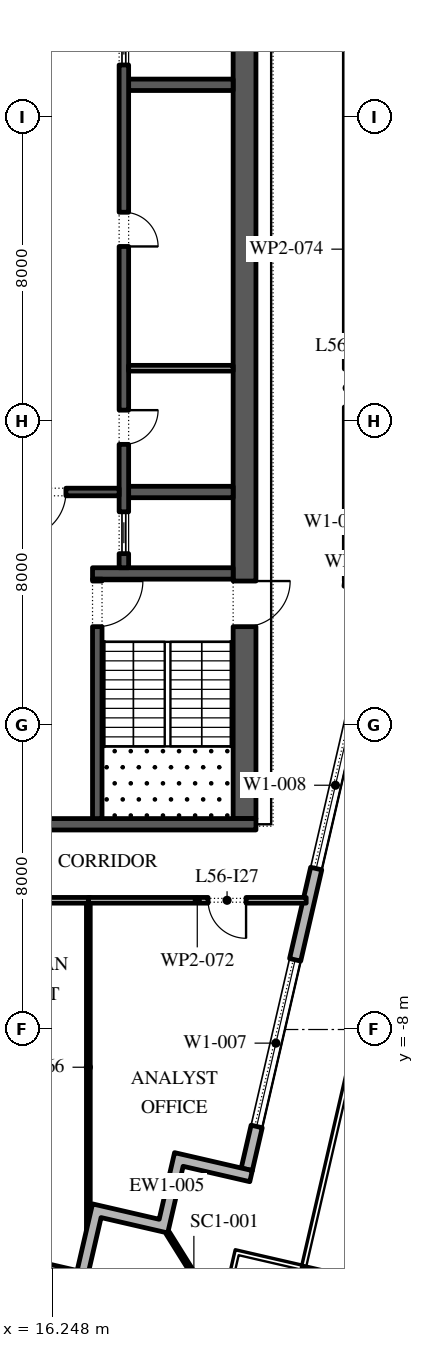
"""IFC4 building model, lengths in metres.
Left out: names, types, materials, properties, quantities, classifications, styles, units other than length and angle.
Written with IfcOpenShell. Run it as: python <this file> out.ifc"""

import sys

from ifc_helpers import new_model, si_unit, direction, frame, frame_2d, origin, origin_2d, place, context, subcontext, project, spatial, polyline, rectangle, outline, extrude, element, fill, save


model = new_model("IFC4")
c1 = context("Model", 3, precision=1e-05, world=origin(), true_north=direction((0.0, 1.0)))
c2 = subcontext(c1, "Body", "Model", "MODEL_VIEW")
j1 = project(units=[si_unit("LENGTHUNIT", "METRE"), si_unit("PLANEANGLEUNIT", "RADIAN")], contexts=[c1])
p1 = place(None, origin())
s1 = spatial("IfcSite", under=j1, at=p1, CompositionType="ELEMENT")
p2 = place(p1, origin())
s2 = spatial("IfcBuilding", under=s1, at=p2, CompositionType="ELEMENT")
p3 = place(p2, frame((0.0, 0.0, 259.8)))
s3 = spatial("IfcBuildingStorey", under=s2, at=p3, CompositionType="ELEMENT", Elevation=259.8)
p4 = place(p3, frame((23.236, -14.883, 0.0), z_axis=(0.0, 0.0, 1.0), x_axis=(0.974370064785, -0.224951054344, 0.0)))
e1 = element("IfcColumn", 1, at=p4, inside=s3, PredefinedType="COLUMN", context=c2, shape_type="SweptSolid", body=[
    extrude(rectangle(XDim=1.1, YDim=1.1, at=origin_2d()), origin(), (0.0, 0.0, 1.0), 4.2),
])
p5 = place(p3, frame((-29.616, -3.758, 0.0), z_axis=(0.0, 0.0, 1.0), x_axis=(0.974370532314, -0.224949029246, 0.0)))
e2 = element("IfcWall", 2, at=p5, inside=s3, PredefinedType="STANDARD", context=c2, shape_type="SweptSolid", body=[
    extrude(rectangle(XDim=48.0, YDim=0.3, at=frame_2d((24.0, 0.0))), origin(), (0.0, 0.0, 1.0), 4.0),
])
p6 = place(p5, frame((1.625, 0.0, 0.45)))
e3 = element("IfcOpeningElement", 3, at=p6, cuts=e2, PredefinedType="OPENING", context=c2, shape_type="SweptSolid", body=[
    extrude(rectangle(XDim=4.5, YDim=3.05, at=frame_2d((2.25, 1.525))), frame((0.0, 0.16, 0.0), z_axis=(0.0, -1.0, 0.0), x_axis=(1.0, 0.0, 0.0)), (0.0, 0.0, 1.0), 0.32),
])
p7 = place(p5, frame((10.575, 0.0, 0.0)))
e4 = element("IfcOpeningElement", 4, at=p7, cuts=e2, PredefinedType="OPENING", context=c2, shape_type="SweptSolid", body=[
    extrude(rectangle(XDim=2.4, YDim=3.5, at=frame_2d((1.2, 1.75))), frame((0.0, 0.16, 0.0), z_axis=(0.0, -1.0, 0.0), x_axis=(1.0, 0.0, 0.0)), (0.0, 0.0, 1.0), 0.32),
])
p8 = place(p5, frame((17.575, 0.0, 0.45)))
e5 = element("IfcOpeningElement", 5, at=p8, cuts=e2, PredefinedType="OPENING", context=c2, shape_type="SweptSolid", body=[
    extrude(rectangle(XDim=4.5, YDim=3.0, at=frame_2d((2.25, 1.5))), frame((0.0, 0.16, 0.0), z_axis=(0.0, -1.0, 0.0), x_axis=(1.0, 0.0, 0.0)), (0.0, 0.0, 1.0), 0.32),
])
p9 = place(p5, frame((25.625, 0.0, 0.45)))
e6 = element("IfcOpeningElement", 6, at=p9, cuts=e2, PredefinedType="OPENING", context=c2, shape_type="SweptSolid", body=[
    extrude(rectangle(XDim=4.5, YDim=2.95, at=frame_2d((2.25, 1.475))), frame((0.0, 0.16, 0.0), z_axis=(0.0, -1.0, 0.0), x_axis=(1.0, 0.0, 0.0)), (0.0, 0.0, 1.0), 0.32),
])
p10 = place(p5, frame((33.675, 0.0, 0.45)))
e7 = element("IfcOpeningElement", 7, at=p10, cuts=e2, PredefinedType="OPENING", context=c2, shape_type="SweptSolid", body=[
    extrude(rectangle(XDim=4.5, YDim=2.825, at=frame_2d((2.25, 1.413))), frame((0.0, 0.16, 0.0), z_axis=(0.0, -1.0, 0.0), x_axis=(1.0, 0.0, 0.0)), (0.0, 0.0, 1.0), 0.32),
])
p11 = place(p5, frame((42.775, 0.0, 0.0)))
e8 = element("IfcOpeningElement", 8, at=p11, cuts=e2, PredefinedType="OPENING", context=c2, shape_type="SweptSolid", body=[
    extrude(rectangle(XDim=2.4, YDim=3.5, at=frame_2d((1.2, 1.75))), frame((0.0, 0.16, 0.0), z_axis=(0.0, -1.0, 0.0), x_axis=(1.0, 0.0, 0.0)), (0.0, 0.0, 1.0), 0.32),
])
p12 = place(p3, frame((21.359, -11.678, 0.0), z_axis=(0.0, 0.0, 1.0), x_axis=(0.224949198343, 0.974370493275, 0.0)))
e9 = element("IfcWall", 9, at=p12, inside=s3, PredefinedType="STANDARD", context=c2, shape_type="SweptSolid", body=[
    extrude(rectangle(XDim=49.5, YDim=0.3, at=frame_2d((24.75, 0.0))), origin(), (0.0, 0.0, 1.0), 4.0),
])
p13 = place(p12, frame((1.157, 0.0, 0.45)))
e10 = element("IfcOpeningElement", 10, at=p13, cuts=e9, PredefinedType="OPENING", context=c2, shape_type="SweptSolid", body=[
    extrude(rectangle(XDim=4.5, YDim=3.05, at=frame_2d((2.25, 1.525))), frame((0.0, 0.16, 0.0), z_axis=(0.0, -1.0, 0.0), x_axis=(1.0, 0.0, 0.0)), (0.0, 0.0, 1.0), 0.32),
])
p14 = place(p12, frame((8.121, 0.0, 0.45)))
e11 = element("IfcOpeningElement", 11, at=p14, cuts=e9, PredefinedType="OPENING", context=c2, shape_type="SweptSolid", body=[
    extrude(rectangle(XDim=4.5, YDim=3.05, at=frame_2d((2.25, 1.525))), frame((0.0, 0.16, 0.0), z_axis=(0.0, -1.0, 0.0), x_axis=(1.0, 0.0, 0.0)), (0.0, 0.0, 1.0), 0.32),
])
p15 = place(p12, frame((15.236, 0.0, 0.45)))
e12 = element("IfcOpeningElement", 12, at=p15, cuts=e9, PredefinedType="OPENING", context=c2, shape_type="SweptSolid", body=[
    extrude(rectangle(XDim=4.5, YDim=3.05, at=frame_2d((2.25, 1.525))), frame((0.0, 0.16, 0.0), z_axis=(0.0, -1.0, 0.0), x_axis=(1.0, 0.0, 0.0)), (0.0, 0.0, 1.0), 0.32),
])
p16 = place(p12, frame((22.35, 0.0, 0.45)))
e13 = element("IfcOpeningElement", 13, at=p16, cuts=e9, PredefinedType="OPENING", context=c2, shape_type="SweptSolid", body=[
    extrude(rectangle(XDim=4.5, YDim=3.05, at=frame_2d((2.25, 1.525))), frame((0.0, 0.16, 0.0), z_axis=(0.0, -1.0, 0.0), x_axis=(1.0, 0.0, 0.0)), (0.0, 0.0, 1.0), 0.32),
])
p17 = place(p12, frame((29.464, 0.0, 0.45)))
e14 = element("IfcOpeningElement", 14, at=p17, cuts=e9, PredefinedType="OPENING", context=c2, shape_type="SweptSolid", body=[
    extrude(rectangle(XDim=4.5, YDim=2.95, at=frame_2d((2.25, 1.475))), frame((0.0, 0.16, 0.0), z_axis=(0.0, -1.0, 0.0), x_axis=(1.0, 0.0, 0.0)), (0.0, 0.0, 1.0), 0.32),
])
p18 = place(p12, frame((37.628, 0.0, 0.0)))
e15 = element("IfcOpeningElement", 15, at=p18, cuts=e9, PredefinedType="OPENING", context=c2, shape_type="SweptSolid", body=[
    extrude(rectangle(XDim=2.4, YDim=3.325, at=frame_2d((1.2, 1.663))), frame((0.0, 0.16, 0.0), z_axis=(0.0, -1.0, 0.0), x_axis=(1.0, 0.0, 0.0)), (0.0, 0.0, 1.0), 0.32),
])
p19 = place(p12, frame((43.693, 0.0, 0.45)))
e16 = element("IfcOpeningElement", 16, at=p19, cuts=e9, PredefinedType="OPENING", context=c2, shape_type="SweptSolid", body=[
    extrude(rectangle(XDim=4.5, YDim=3.05, at=frame_2d((2.25, 1.525))), frame((0.0, 0.16, 0.0), z_axis=(0.0, -1.0, 0.0), x_axis=(1.0, 0.0, 0.0)), (0.0, 0.0, 1.0), 0.32),
])
p20 = place(p3, origin())
e17 = element("IfcWall", 17, at=p20, inside=s3, PredefinedType="STANDARD", context=c2, shape_type="SweptSolid", body=[
    extrude(outline(polyline([(19.054, -12.993), (19.459, -11.24), (21.505, -11.712), (21.438, -12.004), (19.684, -11.599), (19.279, -13.353), (17.525, -12.948), (17.188, -14.41), (16.895, -14.342), (17.3, -12.588), (19.054, -12.993)])), origin(), (0.0, 0.0, 1.0), 4.0),
])
p21 = place(p3, frame((19.279, -13.353, -0.05), z_axis=(0.0, 0.0, 1.0), x_axis=(0.529914407191, -0.848051131154, 0.0)))
e18 = element("IfcWall", 18, at=p21, inside=s3, PredefinedType="STANDARD", context=c2, shape_type="SweptSolid", body=[
    extrude(rectangle(XDim=2.596, YDim=0.1, at=frame_2d((1.298, 0.0))), origin(), (0.0, 0.0, 1.0), 4.05),
])
p22 = place(p3, frame((21.3, -2.45, 0.0), z_axis=(0.0, 0.0, 1.0), x_axis=(0.0, 1.0, 0.0)))
e19 = element("IfcWall", 19, at=p22, inside=s3, PredefinedType="SHEAR", context=c2, shape_type="SweptSolid", body=[
    extrude(rectangle(XDim=27.9, YDim=0.6, at=frame_2d((13.95, 0.0))), origin(), (0.0, 0.0, 1.0), 4.0),
])
p23 = place(p22, frame((5.05, 0.0, 0.0)))
e20 = element("IfcOpeningElement", 20, at=p23, cuts=e19, PredefinedType="OPENING", context=c2, shape_type="SweptSolid", body=[
    extrude(rectangle(XDim=1.2, YDim=2.1, at=frame_2d((0.6, 1.05))), frame((0.0, 0.31, 0.0), z_axis=(0.0, -1.0, 0.0), x_axis=(1.0, 0.0, 0.0)), (0.0, 0.0, 1.0), 0.62),
])
p24 = place(p22, frame((21.65, 0.0, 0.0)))
e21 = element("IfcOpeningElement", 21, at=p24, cuts=e19, PredefinedType="OPENING", context=c2, shape_type="SweptSolid", body=[
    extrude(rectangle(XDim=1.2, YDim=2.1, at=frame_2d((0.6, 1.05))), frame((0.0, 0.31, 0.0), z_axis=(0.0, -1.0, 0.0), x_axis=(1.0, 0.0, 0.0)), (0.0, 0.0, 1.0), 0.62),
])
p25 = place(p3, frame((10.4, -2.6, 0.0), z_axis=(0.0, 0.0, 1.0), x_axis=(1.0, 0.0, 0.0)))
e22 = element("IfcWall", 22, at=p25, inside=s3, PredefinedType="SHEAR", context=c2, shape_type="SweptSolid", body=[
    extrude(rectangle(XDim=11.2, YDim=0.3, at=frame_2d((5.6, 0.0))), origin(), (0.0, 0.0, 1.0), 4.0),
])
p26 = place(p3, frame((17.3, 4.0, 0.0), z_axis=(0.0, 0.0, 1.0), x_axis=(1.0, 0.0, 0.0)))
e23 = element("IfcWall", 23, at=p26, inside=s3, PredefinedType="SHEAR", context=c2, shape_type="SweptSolid", body=[
    extrude(rectangle(XDim=3.7, YDim=0.3, at=frame_2d((1.85, 0.0))), origin(), (0.0, 0.0, 1.0), 4.0),
])
p27 = place(p3, frame((17.425, -2.45, 0.0), z_axis=(0.0, 0.0, 1.0), x_axis=(0.0, 1.0, 0.0)))
e24 = element("IfcWall", 24, at=p27, inside=s3, PredefinedType="SHEAR", context=c2, shape_type="SweptSolid", body=[
    extrude(rectangle(XDim=6.3, YDim=0.25, at=frame_2d((3.15, 0.0))), origin(), (0.0, 0.0, 1.0), 4.0),
])
p28 = place(p27, frame((5.05, 0.0, 0.0)))
e25 = element("IfcOpeningElement", 25, at=p28, cuts=e24, PredefinedType="OPENING", context=c2, shape_type="SweptSolid", body=[
    extrude(rectangle(XDim=1.2, YDim=2.1, at=frame_2d((0.6, 1.05))), frame((0.0, 0.135, 0.0), z_axis=(0.0, -1.0, 0.0), x_axis=(1.0, 0.0, 0.0)), (0.0, 0.0, 1.0), 0.27),
])
for number, where, z_axis, x_axis in (
    (26, (18.25, 6.143, 0.0), (0.0, 0.0, 1.0), (1.0, 0.0, 0.0)),
    (27, (18.25, 16.857, 0.0), (0.0, 0.0, 1.0), (1.0, 0.0, 0.0)),
):
    element("IfcWall", number, at=place(p3, frame(where, z_axis=z_axis, x_axis=x_axis)), inside=s3, PredefinedType="SHEAR", context=c2, shape_type="SweptSolid", body=[
        extrude(rectangle(XDim=2.75, YDim=0.3, at=frame_2d((1.375, 0.0))), origin(), (0.0, 0.0, 1.0), 4.0),
    ])
p29 = place(p3, frame((18.125, 4.15, 0.0), z_axis=(0.0, 0.0, 1.0), x_axis=(0.0, 1.0, 0.0)))
e28 = element("IfcWall", 28, at=p29, inside=s3, PredefinedType="SHEAR", context=c2, shape_type="SweptSolid", body=[
    extrude(rectangle(XDim=14.7, YDim=0.25, at=frame_2d((7.35, 0.0))), origin(), (0.0, 0.0, 1.0), 4.0),
])
p30 = place(p29, frame((3.246, 0.0, 0.0)))
e29 = element("IfcOpeningElement", 29, at=p30, cuts=e28, PredefinedType="OPENING", context=c2, shape_type="SweptSolid", body=[
    extrude(rectangle(XDim=0.9, YDim=2.1, at=frame_2d((0.45, 1.05))), frame((0.0, 0.135, 0.0), z_axis=(0.0, -1.0, 0.0), x_axis=(1.0, 0.0, 0.0)), (0.0, 0.0, 1.0), 0.27),
])
p31 = place(p29, frame((8.454, 0.0, 0.0)))
e30 = element("IfcOpeningElement", 30, at=p31, cuts=e28, PredefinedType="OPENING", context=c2, shape_type="SweptSolid", body=[
    extrude(rectangle(XDim=0.9, YDim=2.1, at=frame_2d((0.45, 1.05))), frame((0.0, 0.135, 0.0), z_axis=(0.0, -1.0, 0.0), x_axis=(1.0, 0.0, 0.0)), (0.0, 0.0, 1.0), 0.27),
])
p32 = place(p29, frame((0.371, 0.0, 0.0)))
e31 = element("IfcOpeningElement", 31, at=p32, cuts=e28, PredefinedType="OPENING", context=c2, shape_type="SweptSolid", body=[
    extrude(rectangle(XDim=1.1, YDim=2.1, at=frame_2d((0.55, 1.05))), frame((0.0, 0.135, 0.0), z_axis=(0.0, -1.0, 0.0), x_axis=(1.0, 0.0, 0.0)), (0.0, 0.0, 1.0), 0.27),
])
p33 = place(p29, frame((13.229, 0.0, 0.0)))
e32 = element("IfcOpeningElement", 32, at=p33, cuts=e28, PredefinedType="OPENING", context=c2, shape_type="SweptSolid", body=[
    extrude(rectangle(XDim=1.1, YDim=2.1, at=frame_2d((0.55, 1.05))), frame((0.0, 0.135, 0.0), z_axis=(0.0, -1.0, 0.0), x_axis=(1.0, 0.0, 0.0)), (0.0, 0.0, 1.0), 0.27),
])
p34 = place(p3, frame((18.25, 9.4, 0.0), z_axis=(0.0, 0.0, 1.0), x_axis=(1.0, 0.0, 0.0)))
e33 = element("IfcWall", 33, at=p34, inside=s3, PredefinedType="PARTITIONING", context=c2, shape_type="SweptSolid", body=[
    extrude(rectangle(XDim=2.75, YDim=0.15, at=frame_2d((1.375, 0.0))), origin(), (0.0, 0.0, 1.0), 4.0),
])
p35 = place(p3, frame((14.0, 6.143, 0.0), z_axis=(0.0, 0.0, 1.0), x_axis=(1.0, 0.0, 0.0)))
e34 = element("IfcWall", 34, at=p35, inside=s3, PredefinedType="SHEAR", context=c2, shape_type="SweptSolid", body=[
    extrude(rectangle(XDim=4.0, YDim=0.2, at=frame_2d((2.0, 0.0))), origin(), (0.0, 0.0, 1.0), 4.0),
])
p36 = place(p35, frame((1.4, 0.0, 0.0)))
e35 = element("IfcOpeningElement", 35, at=p36, cuts=e34, PredefinedType="OPENING", context=c2, shape_type="SweptSolid", body=[
    extrude(rectangle(XDim=1.2, YDim=2.1, at=frame_2d((0.6, 1.05))), frame((0.0, 0.11, 0.0), z_axis=(0.0, -1.0, 0.0), x_axis=(1.0, 0.0, 0.0)), (0.0, 0.0, 1.0), 0.22),
])
p37 = place(p3, frame((17.24, -4.6, 0.0), z_axis=(0.0, 0.0, 1.0), x_axis=(-1.0, 0.0, 0.0)))
e36 = element("IfcWall", 36, at=p37, inside=s3, PredefinedType="PARTITIONING", context=c2, shape_type="SweptSolid", body=[
    extrude(rectangle(XDim=7.165, YDim=0.15, at=frame_2d((3.583, 0.0))), origin(), (0.0, 0.0, 1.0), 4.0),
])
p38 = place(p37, frame((4.59, 0.0, 0.0)))
e37 = element("IfcOpeningElement", 37, at=p38, cuts=e36, PredefinedType="OPENING", context=c2, shape_type="SweptSolid", body=[
    extrude(rectangle(XDim=1.0, YDim=2.1, at=frame_2d((0.5, 1.05))), frame((0.0, 0.085, 0.0), z_axis=(0.0, -1.0, 0.0), x_axis=(1.0, 0.0, 0.0)), (0.0, 0.0, 1.0), 0.17),
])
p39 = place(p3, frame((17.19, -4.675, 0.0), z_axis=(0.0, 0.0, 1.0), x_axis=(0.0, -1.0, 0.0)))
e38 = element("IfcWall", 38, at=p39, inside=s3, PredefinedType="PARTITIONING", context=c2, shape_type="SweptSolid", body=[
    extrude(rectangle(XDim=8.635, YDim=0.1, at=frame_2d((4.317, 0.0))), origin(), (0.0, 0.0, 1.0), 4.0),
])
p40 = place(p3, frame((22.922, -4.6, 0.0), z_axis=(0.0, 0.0, 1.0), x_axis=(-1.0, 0.0, 0.0)))
e39 = element("IfcWall", 39, at=p40, inside=s3, PredefinedType="PARTITIONING", context=c2, shape_type="SweptSolid", body=[
    extrude(rectangle(XDim=5.732, YDim=0.15, at=frame_2d((2.866, 0.0))), origin(), (0.0, 0.0, 1.0), 4.0),
])
p41 = place(p40, frame((1.582, 0.0, 0.0)))
e40 = element("IfcOpeningElement", 40, at=p41, cuts=e39, PredefinedType="OPENING", context=c2, shape_type="SweptSolid", body=[
    extrude(rectangle(XDim=1.0, YDim=2.1, at=frame_2d((0.5, 1.05))), frame((0.0, 0.085, 0.0), z_axis=(0.0, -1.0, 0.0), x_axis=(1.0, 0.0, 0.0)), (0.0, 0.0, 1.0), 0.17),
])
p42 = place(p3, frame((23.925, 3.739, 0.0), z_axis=(0.0, 0.0, 1.0), x_axis=(0.993344839434, -0.115178253021, 0.0)))
e41 = element("IfcWall", 41, at=p42, inside=s3, PredefinedType="PARTITIONING", context=c2, shape_type="SweptSolid", body=[
    extrude(rectangle(XDim=0.903, YDim=0.15, at=frame_2d((0.452, 0.0))), origin(), (0.0, 0.0, 1.0), 4.0),
])
p43 = place(p3, frame((24.0, 21.26, 0.0), z_axis=(0.0, 0.0, 1.0), x_axis=(0.0, -1.0, 0.0)))
e42 = element("IfcWall", 42, at=p43, inside=s3, PredefinedType="PARTITIONING", context=c2, shape_type="SweptSolid", body=[
    extrude(rectangle(XDim=17.455, YDim=0.15, at=frame_2d((8.728, 0.0))), origin(), (0.0, 0.0, 1.0), 4.0),
])
p44 = place(p43, frame((11.88, 0.0, 0.0)))
e43 = element("IfcOpeningElement", 43, at=p44, cuts=e42, PredefinedType="OPENING", context=c2, shape_type="SweptSolid", body=[
    extrude(rectangle(XDim=1.0, YDim=2.1, at=frame_2d((0.5, 1.05))), frame((0.0, 0.085, 0.0), z_axis=(0.0, -1.0, 0.0), x_axis=(1.0, 0.0, 0.0)), (0.0, 0.0, 1.0), 0.17),
])
p45 = place(p13, origin())
e44 = element("IfcWindow", 44, at=p45, inside=s3, PartitioningType="DOUBLE_PANEL_VERTICAL", PredefinedType="WINDOW", context=c2, shape_type="SweptSolid", body=[
    extrude(rectangle(XDim=4.5, YDim=3.05, at=frame_2d((2.25, 1.525))), frame((0.0, 0.03, 0.0), z_axis=(0.0, -1.0, 0.0), x_axis=(1.0, 0.0, 0.0)), (0.0, 0.0, 1.0), 0.06),
])
fill(e10, e44)
p46 = place(p14, origin())
e45 = element("IfcWindow", 45, at=p46, inside=s3, PartitioningType="DOUBLE_PANEL_VERTICAL", PredefinedType="WINDOW", context=c2, shape_type="SweptSolid", body=[
    extrude(rectangle(XDim=4.5, YDim=3.05, at=frame_2d((2.25, 1.525))), frame((0.0, 0.03, 0.0), z_axis=(0.0, -1.0, 0.0), x_axis=(1.0, 0.0, 0.0)), (0.0, 0.0, 1.0), 0.06),
])
fill(e11, e45)
p47 = place(p30, frame((0.9, -0.2, 0.0), z_axis=(0.0, 0.0, 1.0), x_axis=(-1.0, 0.0, 0.0)))
e46 = element("IfcDoor", 46, at=p47, inside=s3, OperationType="SINGLE_SWING_RIGHT", PredefinedType="DOOR", context=c2, shape_type="SweptSolid", body=[
    extrude(rectangle(XDim=0.9, YDim=2.1, at=frame_2d((0.45, 1.05))), frame((0.0, -0.075, 0.0), z_axis=(0.0, -1.0, 0.0), x_axis=(1.0, 0.0, 0.0)), (0.0, 0.0, 1.0), 0.05),
])
fill(e29, e46)
p48 = place(p31, frame((0.9, -0.2, 0.0), z_axis=(0.0, 0.0, 1.0), x_axis=(-1.0, 0.0, 0.0)))
e47 = element("IfcDoor", 47, at=p48, inside=s3, OperationType="SINGLE_SWING_LEFT", PredefinedType="DOOR", context=c2, shape_type="SweptSolid", body=[
    extrude(rectangle(XDim=0.9, YDim=2.1, at=frame_2d((0.45, 1.05))), frame((0.0, -0.075, 0.0), z_axis=(0.0, -1.0, 0.0), x_axis=(1.0, 0.0, 0.0)), (0.0, 0.0, 1.0), 0.05),
])
fill(e30, e47)
p49 = place(p32, origin())
e48 = element("IfcDoor", 48, at=p49, inside=s3, OperationType="SLIDING_TO_LEFT", PredefinedType="DOOR", context=c2, shape_type="SweptSolid", body=[
    extrude(rectangle(XDim=1.1, YDim=2.1, at=frame_2d((0.55, 1.05))), frame((0.0, 0.025, 0.0), z_axis=(0.0, -1.0, 0.0), x_axis=(1.0, 0.0, 0.0)), (0.0, 0.0, 1.0), 0.05),
])
fill(e31, e48)
p50 = place(p33, origin())
e49 = element("IfcDoor", 49, at=p50, inside=s3, OperationType="SLIDING_TO_LEFT", PredefinedType="DOOR", context=c2, shape_type="SweptSolid", body=[
    extrude(rectangle(XDim=1.1, YDim=2.1, at=frame_2d((0.55, 1.05))), frame((0.0, 0.025, 0.0), z_axis=(0.0, -1.0, 0.0), x_axis=(1.0, 0.0, 0.0)), (0.0, 0.0, 1.0), 0.05),
])
fill(e32, e49)
p51 = place(p36, frame((1.2, 0.0, 0.0), z_axis=(0.0, 0.0, 1.0), x_axis=(-1.0, 0.0, 0.0)))
e50 = element("IfcDoor", 50, at=p51, inside=s3, OperationType="SINGLE_SWING_LEFT", PredefinedType="DOOR", context=c2, shape_type="SweptSolid", body=[
    extrude(rectangle(XDim=1.2, YDim=2.1, at=frame_2d((0.6, 1.05))), frame((0.0, 0.025, 0.0), z_axis=(0.0, -1.0, 0.0), x_axis=(1.0, 0.0, 0.0)), (0.0, 0.0, 1.0), 0.05),
])
fill(e35, e50)
p52 = place(p28, frame((1.2, 0.0, 0.0), z_axis=(0.0, 0.0, 1.0), x_axis=(-1.0, 0.0, 0.0)))
e51 = element("IfcDoor", 51, at=p52, inside=s3, OperationType="SINGLE_SWING_RIGHT", PredefinedType="DOOR", context=c2, shape_type="SweptSolid", body=[
    extrude(rectangle(XDim=1.2, YDim=2.1, at=frame_2d((0.6, 1.05))), frame((0.0, 0.025, 0.0), z_axis=(0.0, -1.0, 0.0), x_axis=(1.0, 0.0, 0.0)), (0.0, 0.0, 1.0), 0.05),
])
fill(e25, e51)
p53 = place(p23, frame((1.2, 0.0, 0.0), z_axis=(0.0, 0.0, 1.0), x_axis=(-1.0, 0.0, 0.0)))
e52 = element("IfcDoor", 52, at=p53, inside=s3, OperationType="SINGLE_SWING_RIGHT", PredefinedType="DOOR", context=c2, shape_type="SweptSolid", body=[
    extrude(rectangle(XDim=1.2, YDim=2.1, at=frame_2d((0.6, 1.05))), frame((0.0, 0.025, 0.0), z_axis=(0.0, -1.0, 0.0), x_axis=(1.0, 0.0, 0.0)), (0.0, 0.0, 1.0), 0.05),
])
fill(e20, e52)
p54 = place(p41, origin())
e53 = element("IfcDoor", 53, at=p54, inside=s3, OperationType="SINGLE_SWING_RIGHT", PredefinedType="DOOR", context=c2, shape_type="SweptSolid", body=[
    extrude(rectangle(XDim=1.0, YDim=2.1, at=frame_2d((0.5, 1.05))), frame((0.0, 0.025, 0.0), z_axis=(0.0, -1.0, 0.0), x_axis=(1.0, 0.0, 0.0)), (0.0, 0.0, 1.0), 0.05),
])
fill(e40, e53)
save(model, sys.argv[1])
